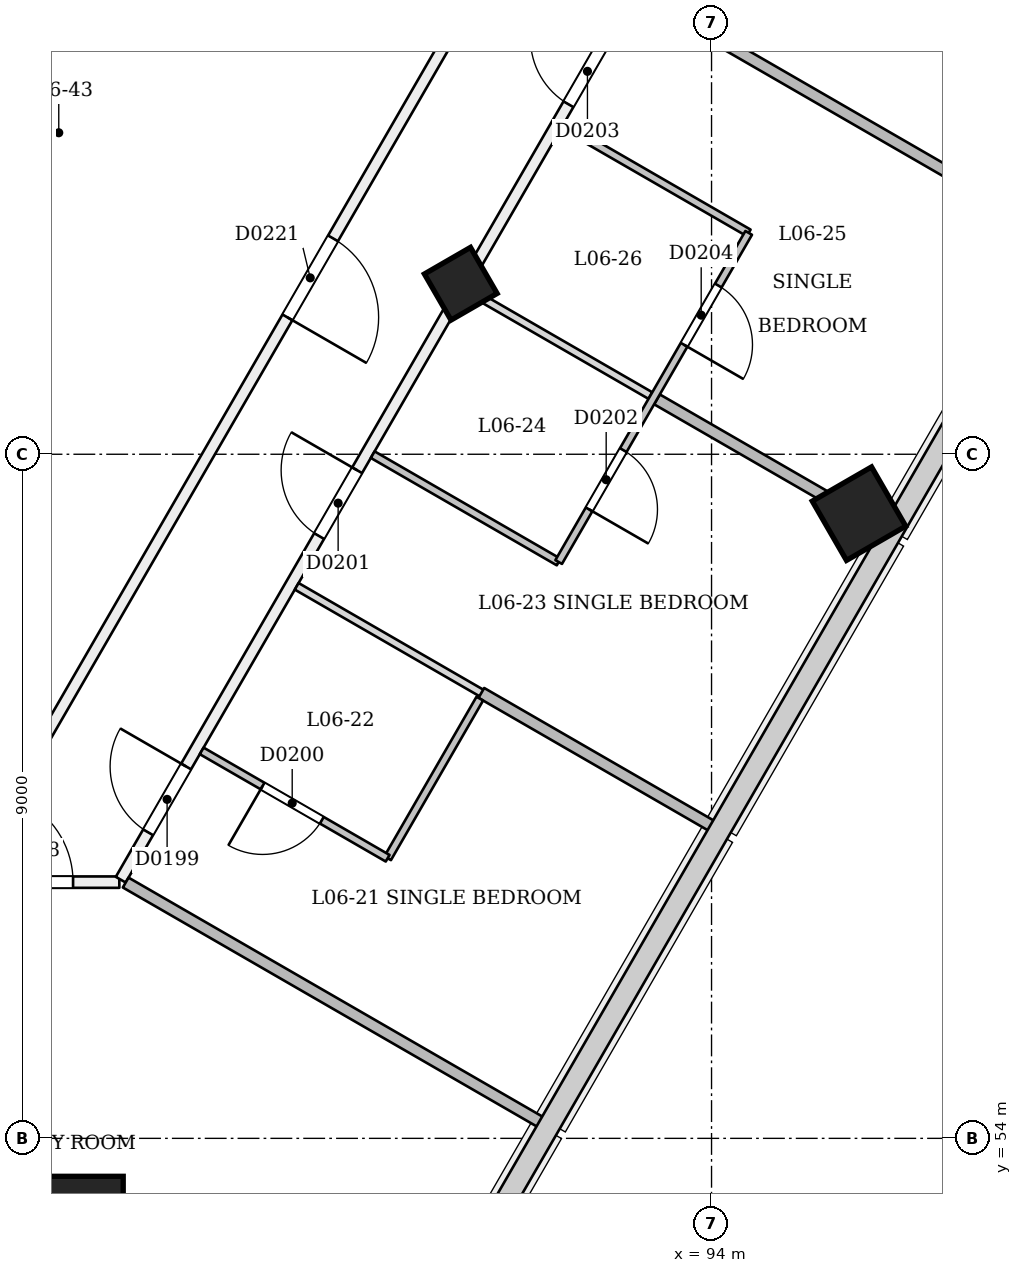
"""IFC4 building model, lengths in metres.
Left out: names, types, materials, properties, quantities, classifications, styles, units other than length and angle.
Written with IfcOpenShell. Run it as: python <this file> out.ifc"""

import sys

from ifc_helpers import new_model, si_unit, direction, frame, frame_2d, origin, origin_2d, place, context, subcontext, project, spatial, rectangle, extrude, element, fill, save


model = new_model("IFC4")
c1 = context("Model", 3, precision=1e-05, world=origin(), true_north=direction((0.0, 1.0)))
c2 = subcontext(c1, "Body", "Model", "MODEL_VIEW")
j1 = project(units=[si_unit("LENGTHUNIT", "METRE"), si_unit("PLANEANGLEUNIT", "RADIAN")], contexts=[c1])
p1 = place(None, origin())
s1 = spatial("IfcSite", under=j1, at=p1, CompositionType="ELEMENT")
p2 = place(p1, origin())
s2 = spatial("IfcBuilding", under=s1, at=p2, CompositionType="ELEMENT")
p3 = place(p2, frame((0.0, 0.0, 30.6)))
s3 = spatial("IfcBuildingStorey", under=s2, at=p3, CompositionType="ELEMENT", Elevation=30.6)
p4 = place(p3, frame((90.728, 65.196, -0.021), z_axis=(-0.022155133694, 0.038483534979, 0.999013597298), x_axis=(-0.501317567522, -0.864978463486, 0.022202571901)))
e1 = element("IfcColumn", 1, at=p4, inside=s3, PredefinedType="COLUMN", context=c2, shape_type="SweptSolid", body=[
    extrude(rectangle(XDim=0.7, YDim=0.7, at=origin_2d()), origin(), (0.0, 0.0, 1.0), 3.604),
])
p5 = place(p3, frame((85.0, 52.171, 0.0), z_axis=(0.0, 0.058360852261, 0.998295552892), x_axis=(-1.0, 0.0, 0.0)))
e2 = element("IfcColumn", 2, at=p5, inside=s3, PredefinedType="COLUMN", context=c2, shape_type="SweptSolid", body=[
    extrude(rectangle(XDim=2.52, YDim=2.52, at=origin_2d()), origin(), (0.0, 0.0, 1.0), 3.606),
])
p6 = place(p3, frame((95.968, 62.171, -0.027), z_axis=(-0.022222852987, 0.038483477124, 0.999012095419), x_axis=(-0.500174611287, -0.865639447942, 0.022219459744)))
e3 = element("IfcColumn", 3, at=p6, inside=s3, PredefinedType="COLUMN", context=c2, shape_type="SweptSolid", body=[
    extrude(rectangle(XDim=0.9, YDim=0.9, at=origin_2d()), origin(), (0.0, 0.0, 1.0), 3.604),
])
p7 = place(p3, frame((83.791, 57.371, 0.0), z_axis=(0.0, 0.0, 1.0), x_axis=(1.0, 0.0, 0.0)))
e4 = element("IfcWall", 4, at=p7, inside=s3, PredefinedType="PARTITIONING", context=c2, shape_type="SweptSolid", body=[
    extrude(rectangle(XDim=2.417, YDim=0.15, at=frame_2d((1.209, 0.0))), origin(), (0.0, 0.0, 1.0), 3.1),
])
p8 = place(p7, frame((0.609, 0.0, 0.0)))
e5 = element("IfcOpeningElement", 5, at=p8, cuts=e4, PredefinedType="OPENING", context=c2, shape_type="SweptSolid", body=[
    extrude(rectangle(XDim=1.2, YDim=2.1, at=frame_2d((0.6, 1.05))), frame((0.0, 0.085, 0.0), z_axis=(0.0, -1.0, 0.0), x_axis=(1.0, 0.0, 0.0)), (0.0, 0.0, 1.0), 0.171),
])
p9 = place(p3, frame((86.227, 57.403, 0.0), z_axis=(0.0, 0.0, 1.0), x_axis=(0.5000018851, 0.866024315419, 0.0)))
e6 = element("IfcWall", 6, at=p9, inside=s3, PredefinedType="PARTITIONING", context=c2, shape_type="SweptSolid", body=[
    extrude(rectangle(XDim=45.0, YDim=0.15, at=frame_2d((22.5, 0.0))), origin(), (0.0, 0.0, 1.0), 2.7),
])
p10 = place(p9, frame((0.72, 0.0, 0.0)))
e7 = element("IfcOpeningElement", 7, at=p10, cuts=e6, PredefinedType="OPENING", context=c2, shape_type="SweptSolid", body=[
    extrude(rectangle(XDim=1.0, YDim=2.1, at=frame_2d((0.5, 1.05))), frame((0.0, 0.085, 0.0), z_axis=(0.0, -1.0, 0.0), x_axis=(1.0, 0.0, 0.0)), (0.0, 0.0, 1.0), 0.171),
])
p11 = place(p9, frame((5.22, 0.0, 0.0)))
e8 = element("IfcOpeningElement", 8, at=p11, cuts=e6, PredefinedType="OPENING", context=c2, shape_type="SweptSolid", body=[
    extrude(rectangle(XDim=1.0, YDim=2.1, at=frame_2d((0.5, 1.05))), frame((0.0, 0.085, 0.0), z_axis=(0.0, -1.0, 0.0), x_axis=(1.0, 0.0, 0.0)), (0.0, 0.0, 1.0), 0.171),
])
p12 = place(p9, frame((11.78, 0.0, 0.0)))
e9 = element("IfcOpeningElement", 9, at=p12, cuts=e6, PredefinedType="OPENING", context=c2, shape_type="SweptSolid", body=[
    extrude(rectangle(XDim=1.0, YDim=2.1, at=frame_2d((0.5, 1.05))), frame((0.0, 0.085, 0.0), z_axis=(0.0, -1.0, 0.0), x_axis=(1.0, 0.0, 0.0)), (0.0, 0.0, 1.0), 0.171),
])
p13 = place(p9, frame((14.22, 0.0, 0.0)))
e10 = element("IfcOpeningElement", 10, at=p13, cuts=e6, PredefinedType="OPENING", context=c2, shape_type="SweptSolid", body=[
    extrude(rectangle(XDim=1.0, YDim=2.1, at=frame_2d((0.5, 1.05))), frame((0.0, 0.085, 0.0), z_axis=(0.0, -1.0, 0.0), x_axis=(1.0, 0.0, 0.0)), (0.0, 0.0, 1.0), 0.171),
])
p14 = place(p9, frame((19.75, 0.0, 0.0)))
e11 = element("IfcOpeningElement", 11, at=p14, cuts=e6, PredefinedType="OPENING", context=c2, shape_type="SweptSolid", body=[
    extrude(rectangle(XDim=1.0, YDim=2.1, at=frame_2d((0.5, 1.05))), frame((0.0, 0.085, 0.0), z_axis=(0.0, -1.0, 0.0), x_axis=(1.0, 0.0, 0.0)), (0.0, 0.0, 1.0), 0.171),
])
p15 = place(p9, frame((23.105, 0.0, 0.0)))
e12 = element("IfcOpeningElement", 12, at=p15, cuts=e6, PredefinedType="OPENING", context=c2, shape_type="SweptSolid", body=[
    extrude(rectangle(XDim=1.0, YDim=2.1, at=frame_2d((0.5, 1.05))), frame((0.0, 0.085, 0.0), z_axis=(0.0, -1.0, 0.0), x_axis=(1.0, 0.0, 0.0)), (0.0, 0.0, 1.0), 0.171),
])
p16 = place(p9, frame((28.75, 0.0, 0.0)))
e13 = element("IfcOpeningElement", 13, at=p16, cuts=e6, PredefinedType="OPENING", context=c2, shape_type="SweptSolid", body=[
    extrude(rectangle(XDim=1.0, YDim=2.1, at=frame_2d((0.5, 1.05))), frame((0.0, 0.085, 0.0), z_axis=(0.0, -1.0, 0.0), x_axis=(1.0, 0.0, 0.0)), (0.0, 0.0, 1.0), 0.171),
])
p17 = place(p9, frame((32.105, 0.0, 0.0)))
e14 = element("IfcOpeningElement", 14, at=p17, cuts=e6, PredefinedType="OPENING", context=c2, shape_type="SweptSolid", body=[
    extrude(rectangle(XDim=1.0, YDim=2.1, at=frame_2d((0.5, 1.05))), frame((0.0, 0.085, 0.0), z_axis=(0.0, -1.0, 0.0), x_axis=(1.0, 0.0, 0.0)), (0.0, 0.0, 1.0), 0.171),
])
p18 = place(p9, frame((36.504, 0.0, 0.0)))
e15 = element("IfcOpeningElement", 15, at=p18, cuts=e6, PredefinedType="OPENING", context=c2, shape_type="SweptSolid", body=[
    extrude(rectangle(XDim=1.0, YDim=2.1, at=frame_2d((0.5, 1.05))), frame((0.0, 0.085, 0.0), z_axis=(0.0, -1.0, 0.0), x_axis=(1.0, 0.0, 0.0)), (0.0, 0.0, 1.0), 0.171),
])
p19 = place(p9, frame((38.654, 0.0, 0.0)))
e16 = element("IfcOpeningElement", 16, at=p19, cuts=e6, PredefinedType="OPENING", context=c2, shape_type="SweptSolid", body=[
    extrude(rectangle(XDim=1.0, YDim=2.1, at=frame_2d((0.5, 1.05))), frame((0.0, 0.085, 0.0), z_axis=(0.0, -1.0, 0.0), x_axis=(1.0, 0.0, 0.0)), (0.0, 0.0, 1.0), 0.171),
])
p20 = place(p9, frame((41.071, 0.0, 0.0)))
e17 = element("IfcOpeningElement", 17, at=p20, cuts=e6, PredefinedType="OPENING", context=c2, shape_type="SweptSolid", body=[
    extrude(rectangle(XDim=1.1, YDim=2.1, at=frame_2d((0.55, 1.05))), frame((0.0, 0.085, 0.0), z_axis=(0.0, -1.0, 0.0), x_axis=(1.0, 0.0, 0.0)), (0.0, 0.0, 1.0), 0.171),
])
p21 = place(p3, frame((103.315, 90.6, 0.0), z_axis=(0.0, 0.0, 1.0), x_axis=(-0.499999056994, -0.866025948229, 0.0)))
e18 = element("IfcWall", 18, at=p21, inside=s3, PredefinedType="PARTITIONING", context=c2, shape_type="SweptSolid", body=[
    extrude(rectangle(XDim=36.292, YDim=0.15, at=frame_2d((18.146, 0.0))), origin(), (0.0, 0.0, 1.0), 3.1),
])
p22 = place(p21, frame((10.576, 0.0, 0.0)))
e19 = element("IfcOpeningElement", 19, at=p22, cuts=e18, PredefinedType="OPENING", context=c2, shape_type="SweptSolid", body=[
    extrude(rectangle(XDim=1.2, YDim=2.1, at=frame_2d((0.6, 1.05))), frame((0.0, 0.085, 0.0), z_axis=(0.0, -1.0, 0.0), x_axis=(1.0, 0.0, 0.0)), (0.0, 0.0, 1.0), 0.171),
])
p23 = place(p21, frame((28.59, 0.0, 0.0)))
e20 = element("IfcOpeningElement", 20, at=p23, cuts=e18, PredefinedType="OPENING", context=c2, shape_type="SweptSolid", body=[
    extrude(rectangle(XDim=1.2, YDim=2.1, at=frame_2d((0.6, 1.05))), frame((0.0, 0.085, 0.0), z_axis=(0.0, -1.0, 0.0), x_axis=(1.0, 0.0, 0.0)), (0.0, 0.0, 1.0), 0.171),
])
p24 = place(p21, frame((17.248, 0.0, 0.0)))
e21 = element("IfcOpeningElement", 21, at=p24, cuts=e18, PredefinedType="OPENING", context=c2, shape_type="SweptSolid", body=[
    extrude(rectangle(XDim=1.2, YDim=2.1, at=frame_2d((0.6, 1.05))), frame((0.0, 0.085, 0.0), z_axis=(0.0, -1.0, 0.0), x_axis=(1.0, 0.0, 0.0)), (0.0, 0.0, 1.0), 0.171),
])
p25 = place(p21, frame((4.5, 0.0, 0.0)))
e22 = element("IfcOpeningElement", 22, at=p25, cuts=e18, PredefinedType="OPENING", context=c2, shape_type="SweptSolid", body=[
    extrude(rectangle(XDim=1.2, YDim=2.1, at=frame_2d((0.6, 1.05))), frame((0.0, 0.085, 0.0), z_axis=(0.0, -1.0, 0.0), x_axis=(1.0, 0.0, 0.0)), (0.0, 0.0, 1.0), 0.171),
])
p26 = place(p21, frame((21.947, 0.0, 0.0)))
e23 = element("IfcOpeningElement", 23, at=p26, cuts=e18, PredefinedType="OPENING", context=c2, shape_type="SweptSolid", body=[
    extrude(rectangle(XDim=1.2, YDim=2.1, at=frame_2d((0.6, 1.05))), frame((0.0, 0.085, 0.0), z_axis=(0.0, -1.0, 0.0), x_axis=(1.0, 0.0, 0.0)), (0.0, 0.0, 1.0), 0.171),
])
p27 = place(p3, frame((91.787, 54.193, 0.0), z_axis=(0.0, 0.0, 1.0), x_axis=(-0.866025401434, 0.500000004071, 0.0)))
e24 = element("IfcWall", 24, at=p27, inside=s3, PredefinedType="PARTITIONING", context=c2, shape_type="SweptSolid", body=[
    extrude(rectangle(XDim=6.345, YDim=0.15, at=frame_2d((3.173, 0.0))), origin(), (0.0, 0.0, 1.0), 2.6),
])
p28 = place(p3, frame((90.951, 59.785, 0.0), z_axis=(0.0, 0.0, 1.0), x_axis=(-0.500047793048, -0.865997808697, 0.0)))
e25 = element("IfcWall", 25, at=p28, inside=s3, PredefinedType="PARTITIONING", context=c2, shape_type="SweptSolid", body=[
    extrude(rectangle(XDim=2.425, YDim=0.1, at=frame_2d((1.212, 0.0))), origin(), (0.0, 0.0, 1.0), 3.1),
])
p29 = place(p3, frame((89.739, 57.685, 0.0), z_axis=(0.0, 0.0, 1.0), x_axis=(-0.866048868473, 0.499959355765, 0.0)))
e26 = element("IfcWall", 26, at=p29, inside=s3, PredefinedType="PARTITIONING", context=c2, shape_type="SweptSolid", body=[
    extrude(rectangle(XDim=2.825, YDim=0.1, at=frame_2d((1.413, 0.0))), origin(), (0.0, 0.0, 1.0), 3.1),
])
p30 = place(p29, frame((1.0, 0.0, 0.0)))
e27 = element("IfcOpeningElement", 27, at=p30, cuts=e26, PredefinedType="OPENING", context=c2, shape_type="SweptSolid", body=[
    extrude(rectangle(XDim=0.9, YDim=2.1, at=frame_2d((0.45, 1.05))), frame((0.0, 0.061, 0.0), z_axis=(0.0, -1.0, 0.0), x_axis=(1.0, 0.0, 0.0)), (0.0, 0.0, 1.0), 0.121),
])
p31 = place(p3, frame((94.037, 58.09, 0.0), z_axis=(0.0, 0.0, 1.0), x_axis=(-0.866036293601, 0.499981137809, 0.0)))
e28 = element("IfcWall", 28, at=p31, inside=s3, PredefinedType="PARTITIONING", context=c2, shape_type="SweptSolid", body=[
    extrude(rectangle(XDim=3.54, YDim=0.15, at=frame_2d((1.77, 0.0))), origin(), (0.0, 0.0, 1.0), 2.6),
])
p32 = place(p3, frame((91.006, 59.84, 0.0), z_axis=(0.0, 0.0, 1.0), x_axis=(-0.866011243319, 0.500024525844, 0.0)))
e29 = element("IfcWall", 29, at=p32, inside=s3, PredefinedType="PARTITIONING", context=c2, shape_type="SweptSolid", body=[
    extrude(rectangle(XDim=2.845, YDim=0.1, at=frame_2d((1.422, 0.0))), origin(), (0.0, 0.0, 1.0), 3.1),
])
p33 = place(p3, frame((91.989, 61.582, 0.0), z_axis=(0.0, 0.0, 1.0), x_axis=(-0.866011447264, 0.500024172624, 0.0)))
e30 = element("IfcWall", 30, at=p33, inside=s3, PredefinedType="PARTITIONING", context=c2, shape_type="SweptSolid", body=[
    extrude(rectangle(XDim=2.825, YDim=0.1, at=frame_2d((1.413, 0.0))), origin(), (0.0, 0.0, 1.0), 3.1),
])
p34 = place(p3, frame((96.27, 61.997, 0.0), z_axis=(0.0, 0.0, 1.0), x_axis=(-0.866044174857, 0.499967486139, 0.0)))
e31 = element("IfcWall", 31, at=p34, inside=s3, PredefinedType="PARTITIONING", context=c2, shape_type="SweptSolid", body=[
    extrude(rectangle(XDim=3.45, YDim=0.15, at=frame_2d((1.725, 0.0))), origin(), (0.0, 0.0, 1.0), 2.6),
])
p35 = place(p3, frame((93.196, 63.772, 0.0), z_axis=(0.0, 0.0, 1.0), x_axis=(-0.866042014628, 0.499971228071, 0.0)))
e32 = element("IfcWall", 32, at=p35, inside=s3, PredefinedType="PARTITIONING", context=c2, shape_type="SweptSolid", body=[
    extrude(rectangle(XDim=2.775, YDim=0.1, at=frame_2d((1.388, 0.0))), origin(), (0.0, 0.0, 1.0), 2.7),
])
p36 = place(p3, frame((92.042, 67.325, 0.0), z_axis=(0.0, 0.0, 1.0), x_axis=(0.866048868473, -0.499959355765, 0.0)))
e33 = element("IfcWall", 33, at=p36, inside=s3, PredefinedType="PARTITIONING", context=c2, shape_type="SweptSolid", body=[
    extrude(rectangle(XDim=2.825, YDim=0.1, at=frame_2d((1.413, 0.0))), origin(), (0.0, 0.0, 1.0), 3.1),
])
p37 = place(p3, frame((94.489, 65.912, 0.0), z_axis=(0.0, 0.0, 1.0), x_axis=(-0.499983091616, -0.866035165624, 0.0)))
e34 = element("IfcWall", 34, at=p37, inside=s3, PredefinedType="PARTITIONING", context=c2, shape_type="SweptSolid", body=[
    extrude(rectangle(XDim=5.0, YDim=0.1, at=frame_2d((2.5, 0.0))), origin(), (0.0, 0.0, 1.0), 2.7),
])
p38 = place(p37, frame((3.3, 0.0, 0.0)))
e35 = element("IfcOpeningElement", 35, at=p38, cuts=e34, PredefinedType="OPENING", context=c2, shape_type="SweptSolid", body=[
    extrude(rectangle(XDim=0.9, YDim=2.1, at=frame_2d((0.45, 1.05))), frame((0.0, 0.061, 0.0), z_axis=(0.0, -1.0, 0.0), x_axis=(1.0, 0.0, 0.0)), (0.0, 0.0, 1.0), 0.121),
])
p39 = place(p37, frame((0.8, 0.0, 0.0)))
e36 = element("IfcOpeningElement", 36, at=p39, cuts=e34, PredefinedType="OPENING", context=c2, shape_type="SweptSolid", body=[
    extrude(rectangle(XDim=0.9, YDim=2.1, at=frame_2d((0.45, 1.05))), frame((0.0, 0.061, 0.0), z_axis=(0.0, -1.0, 0.0), x_axis=(1.0, 0.0, 0.0)), (0.0, 0.0, 1.0), 0.121),
])
p40 = place(p3, frame((98.537, 65.884, 0.0), z_axis=(0.0, 0.0, 1.0), x_axis=(-0.866025401434, 0.500000004071, 0.0)))
e37 = element("IfcWall", 37, at=p40, inside=s3, PredefinedType="PARTITIONING", context=c2, shape_type="SweptSolid", body=[
    extrude(rectangle(XDim=6.345, YDim=0.15, at=frame_2d((3.173, 0.0))), origin(), (0.0, 0.0, 1.0), 2.6),
])
p41 = place(p8, origin())
e38 = element("IfcDoor", 38, at=p41, inside=s3, OperationType="SINGLE_SWING_LEFT", PredefinedType="NOTDEFINED", context=c2, shape_type="SweptSolid", body=[
    extrude(rectangle(XDim=1.2, YDim=2.1, at=frame_2d((0.6, 1.05))), frame((0.0, 0.025, 0.0), z_axis=(0.0, -1.0, 0.0), x_axis=(1.0, 0.0, 0.0)), (0.0, 0.0, 1.0), 0.05),
])
fill(e5, e38)
p42 = place(p10, origin())
e39 = element("IfcDoor", 39, at=p42, inside=s3, OperationType="SINGLE_SWING_RIGHT", PredefinedType="NOTDEFINED", context=c2, shape_type="SweptSolid", body=[
    extrude(rectangle(XDim=1.0, YDim=2.1, at=frame_2d((0.5, 1.05))), frame((0.0, 0.025, 0.0), z_axis=(0.0, -1.0, 0.0), x_axis=(1.0, 0.0, 0.0)), (0.0, 0.0, 1.0), 0.05),
])
fill(e7, e39)
p43 = place(p30, origin())
e40 = element("IfcDoor", 40, at=p43, inside=s3, OperationType="SINGLE_SWING_RIGHT", PredefinedType="NOTDEFINED", context=c2, shape_type="SweptSolid", body=[
    extrude(rectangle(XDim=0.9, YDim=2.1, at=frame_2d((0.45, 1.05))), frame((0.0, 0.025, 0.0), z_axis=(0.0, -1.0, 0.0), x_axis=(1.0, 0.0, 0.0)), (0.0, 0.0, 1.0), 0.05),
])
fill(e27, e40)
p44 = place(p11, origin())
e41 = element("IfcDoor", 41, at=p44, inside=s3, OperationType="SINGLE_SWING_RIGHT", PredefinedType="NOTDEFINED", context=c2, shape_type="SweptSolid", body=[
    extrude(rectangle(XDim=1.0, YDim=2.1, at=frame_2d((0.5, 1.05))), frame((0.0, 0.025, 0.0), z_axis=(0.0, -1.0, 0.0), x_axis=(1.0, 0.0, 0.0)), (0.0, 0.0, 1.0), 0.05),
])
fill(e8, e41)
p45 = place(p38, origin())
e42 = element("IfcDoor", 42, at=p45, inside=s3, OperationType="SINGLE_SWING_RIGHT", PredefinedType="NOTDEFINED", context=c2, shape_type="SweptSolid", body=[
    extrude(rectangle(XDim=0.9, YDim=2.1, at=frame_2d((0.45, 1.05))), frame((0.0, 0.025, 0.0), z_axis=(0.0, -1.0, 0.0), x_axis=(1.0, 0.0, 0.0)), (0.0, 0.0, 1.0), 0.05),
])
fill(e35, e42)
p46 = place(p12, origin())
e43 = element("IfcDoor", 43, at=p46, inside=s3, OperationType="SINGLE_SWING_RIGHT", PredefinedType="NOTDEFINED", context=c2, shape_type="SweptSolid", body=[
    extrude(rectangle(XDim=1.0, YDim=2.1, at=frame_2d((0.5, 1.05))), frame((0.0, 0.025, 0.0), z_axis=(0.0, -1.0, 0.0), x_axis=(1.0, 0.0, 0.0)), (0.0, 0.0, 1.0), 0.05),
])
fill(e9, e43)
p47 = place(p39, origin())
e44 = element("IfcDoor", 44, at=p47, inside=s3, OperationType="SINGLE_SWING_RIGHT", PredefinedType="NOTDEFINED", context=c2, shape_type="SweptSolid", body=[
    extrude(rectangle(XDim=0.9, YDim=2.1, at=frame_2d((0.45, 1.05))), frame((0.0, 0.025, 0.0), z_axis=(0.0, -1.0, 0.0), x_axis=(1.0, 0.0, 0.0)), (0.0, 0.0, 1.0), 0.05),
])
fill(e36, e44)
p48 = place(p23, origin())
e45 = element("IfcDoor", 45, at=p48, inside=s3, OperationType="SINGLE_SWING_RIGHT", PredefinedType="NOTDEFINED", context=c2, shape_type="SweptSolid", body=[
    extrude(rectangle(XDim=1.2, YDim=2.1, at=frame_2d((0.6, 1.05))), frame((0.0, 0.025, 0.0), z_axis=(0.0, -1.0, 0.0), x_axis=(1.0, 0.0, 0.0)), (0.0, 0.0, 1.0), 0.05),
])
fill(e20, e45)
save(model, sys.argv[1])
